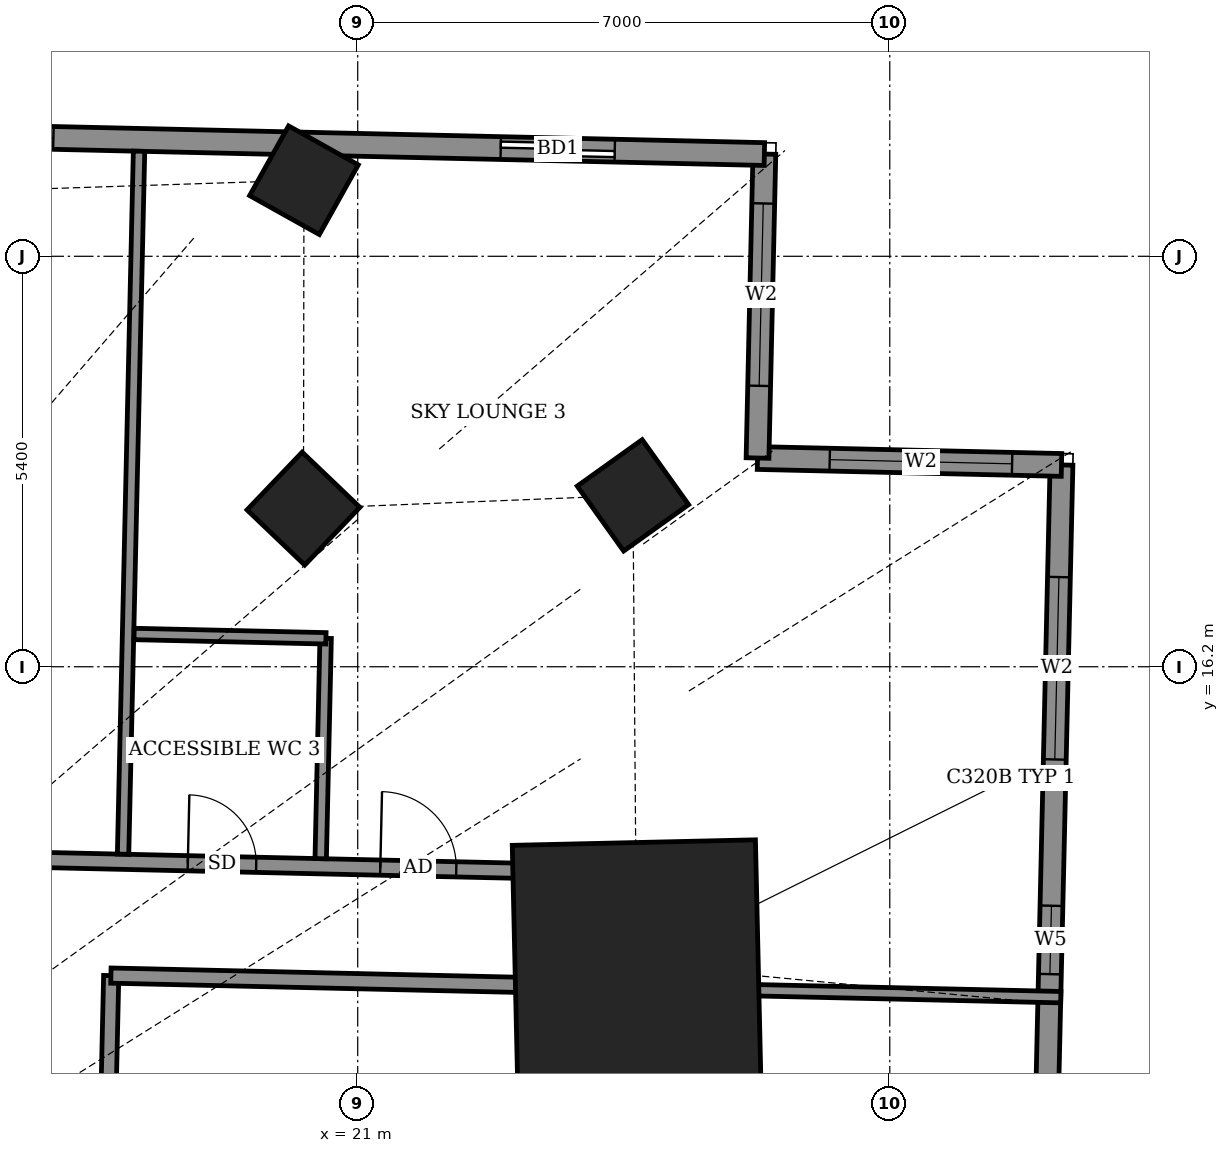
"""IFC4 building model, lengths in metres.
Left out: names, types, materials, properties, quantities, classifications, styles, units other than length and angle.
Written with IfcOpenShell. Run it as: python <this file> out.ifc"""

import sys

from ifc_helpers import new_model, si_unit, direction, frame, frame_2d, origin, origin_2d, place, context, subcontext, project, spatial, rectangle, extrude, element, fill, save


model = new_model("IFC4")
c1 = context("Model", 3, precision=1e-05, world=origin(), true_north=direction((0.0, 1.0)))
c2 = subcontext(c1, "Body", "Model", "MODEL_VIEW")
j1 = project(units=[si_unit("LENGTHUNIT", "METRE"), si_unit("PLANEANGLEUNIT", "RADIAN")], contexts=[c1])
p1 = place(None, origin())
s1 = spatial("IfcSite", under=j1, at=p1, CompositionType="ELEMENT")
p2 = place(p1, origin())
s2 = spatial("IfcBuilding", under=s1, at=p2, CompositionType="ELEMENT")
p3 = place(p2, frame((0.0, 0.0, 252.7)))
s3 = spatial("IfcBuildingStorey", under=s2, at=p3, CompositionType="ELEMENT", Elevation=252.7)
for number, where, z_axis, x_axis in (
    (1, (24.621, 18.455, -0.55), (0.0, 0.0, 1.0), (-0.581, 0.814, 0.0)),
    (2, (20.286, 18.281, -0.55), (0.0, 0.0, 1.0), (-0.723, 0.691, 0.0)),
    (3, (20.293, 22.601, -0.55), (0.0, 0.0, 1.0), (-0.873, 0.488, 0.0)),
):
    element("IfcColumn", number, at=place(p3, frame(where, z_axis=z_axis, x_axis=x_axis)), inside=s3, PredefinedType="COLUMN", context=c2, shape_type="SweptSolid", body=[
        extrude(rectangle(XDim=1.05, YDim=1.05, at=origin_2d()), origin(), (0.0, 0.0, 1.0), 4.6),
    ])
p4 = place(p3, frame((24.669, 12.287, -0.55), z_axis=(0.0, 0.0, 1.0), x_axis=(-0.022668680801, 0.999743032439, 0.0)))
e4 = element("IfcColumn", 4, at=p4, inside=s3, PredefinedType="COLUMN", context=c2, shape_type="SweptSolid", body=[
    extrude(rectangle(XDim=3.2, YDim=3.2, at=origin_2d()), origin(), (0.0, 0.0, 1.0), 4.6),
])
p5 = place(p3, frame((29.933, 4.529, 0.0), z_axis=(0.0, 0.0, 1.0), x_axis=(0.022745013272, 0.999741298722, 0.0)))
e5 = element("IfcWall", 5, at=p5, inside=s3, PredefinedType="SOLIDWALL", context=c2, shape_type="SweptSolid", body=[
    extrude(rectangle(XDim=14.33, YDim=0.3, at=frame_2d((7.165, 0.0))), origin(), (0.0, 0.0, 1.0), 2.85),
])
p6 = place(p5, frame((4.564, 0.0, 0.0)))
e6 = element("IfcOpeningElement", 6, at=p6, cuts=e5, PredefinedType="OPENING", context=c2, shape_type="SweptSolid", body=[
    extrude(rectangle(XDim=1.5, YDim=2.4, at=frame_2d((0.75, 1.2))), frame((0.0, 0.16, 0.0), z_axis=(0.0, -1.0, 0.0), x_axis=(1.0, 0.0, 0.0)), (0.0, 0.0, 1.0), 0.32),
])
p7 = place(p5, frame((7.629, 0.0, 0.9)))
e7 = element("IfcOpeningElement", 7, at=p7, cuts=e5, PredefinedType="OPENING", context=c2, shape_type="SweptSolid", body=[
    extrude(rectangle(XDim=0.9, YDim=1.5, at=frame_2d((0.45, 0.75))), frame((0.0, 0.16, 0.0), z_axis=(0.0, -1.0, 0.0), x_axis=(1.0, 0.0, 0.0)), (0.0, 0.0, 1.0), 0.32),
])
p8 = place(p5, frame((10.454, 0.0, 0.9)))
e8 = element("IfcOpeningElement", 8, at=p8, cuts=e5, PredefinedType="OPENING", context=c2, shape_type="SweptSolid", body=[
    extrude(rectangle(XDim=2.4, YDim=1.5, at=frame_2d((1.2, 0.75))), frame((0.0, 0.16, 0.0), z_axis=(0.0, -1.0, 0.0), x_axis=(1.0, 0.0, 0.0)), (0.0, 0.0, 1.0), 0.32),
])
p9 = place(p3, frame((30.259, 18.855, 0.0), z_axis=(0.0, 0.0, 1.0), x_axis=(-0.999740826251, 0.022765770952, 0.0)))
e9 = element("IfcWall", 9, at=p9, inside=s3, PredefinedType="SOLIDWALL", context=c2, shape_type="SweptSolid", body=[
    extrude(rectangle(XDim=4.0, YDim=0.3, at=frame_2d((2.0, 0.0))), origin(), (0.0, 0.0, 1.0), 2.85),
])
p10 = place(p9, frame((0.65, 0.0, 0.9)))
e10 = element("IfcOpeningElement", 10, at=p10, cuts=e9, PredefinedType="OPENING", context=c2, shape_type="SweptSolid", body=[
    extrude(rectangle(XDim=2.4, YDim=1.5, at=frame_2d((1.2, 0.75))), frame((0.0, 0.16, 0.0), z_axis=(0.0, -1.0, 0.0), x_axis=(1.0, 0.0, 0.0)), (0.0, 0.0, 1.0), 0.32),
])
p11 = place(p3, frame((26.26, 18.946, 0.0), z_axis=(0.0, 0.0, 1.0), x_axis=(0.022521758502, 0.999746353029, 0.0)))
e11 = element("IfcWall", 11, at=p11, inside=s3, PredefinedType="SOLIDWALL", context=c2, shape_type="SweptSolid", body=[
    extrude(rectangle(XDim=4.0, YDim=0.3, at=frame_2d((2.0, 0.0))), origin(), (0.0, 0.0, 1.0), 2.85),
])
p12 = place(p11, frame((0.95, 0.0, 0.9)))
e12 = element("IfcOpeningElement", 12, at=p12, cuts=e11, PredefinedType="OPENING", context=c2, shape_type="SweptSolid", body=[
    extrude(rectangle(XDim=2.4, YDim=1.5, at=frame_2d((1.2, 0.75))), frame((0.0, 0.16, 0.0), z_axis=(0.0, -1.0, 0.0), x_axis=(1.0, 0.0, 0.0)), (0.0, 0.0, 1.0), 0.32),
])
p13 = place(p3, frame((26.35, 22.945, 0.0), z_axis=(0.0, 0.0, 1.0), x_axis=(-0.999742523712, 0.022691105788, 0.0)))
e13 = element("IfcWall", 13, at=p13, inside=s3, PredefinedType="SOLIDWALL", context=c2, shape_type="SweptSolid", body=[
    extrude(rectangle(XDim=47.771, YDim=0.3, at=frame_2d((23.886, 0.0))), origin(), (0.0, 0.0, 1.0), 2.45),
])
p14 = place(p13, frame((1.969, 0.0, 0.0)))
e14 = element("IfcOpeningElement", 14, at=p14, cuts=e13, PredefinedType="OPENING", context=c2, shape_type="SweptSolid", body=[
    extrude(rectangle(XDim=1.5, YDim=2.4, at=frame_2d((0.75, 1.2))), frame((0.0, 0.16, 0.0), z_axis=(0.0, -1.0, 0.0), x_axis=(1.0, 0.0, 0.0)), (0.0, 0.0, 1.0), 0.32),
])
p15 = place(p13, frame((9.356, 0.0, 0.9)))
e15 = element("IfcOpeningElement", 15, at=p15, cuts=e13, PredefinedType="OPENING", context=c2, shape_type="SweptSolid", body=[
    extrude(rectangle(XDim=2.4, YDim=1.5, at=frame_2d((1.2, 0.75))), frame((0.0, 0.16, 0.0), z_axis=(0.0, -1.0, 0.0), x_axis=(1.0, 0.0, 0.0)), (0.0, 0.0, 1.0), 0.32),
])
p16 = place(p13, frame((21.81, 0.0, 0.9)))
e16 = element("IfcOpeningElement", 16, at=p16, cuts=e13, PredefinedType="OPENING", context=c2, shape_type="SweptSolid", body=[
    extrude(rectangle(XDim=2.4, YDim=1.5, at=frame_2d((1.2, 0.75))), frame((0.0, 0.16, 0.0), z_axis=(0.0, -1.0, 0.0), x_axis=(1.0, 0.0, 0.0)), (0.0, 0.0, 1.0), 0.32),
])
p17 = place(p13, frame((25.667, 0.0, 0.0)))
e17 = element("IfcOpeningElement", 17, at=p17, cuts=e13, PredefinedType="OPENING", context=c2, shape_type="SweptSolid", body=[
    extrude(rectangle(XDim=1.5, YDim=2.4, at=frame_2d((0.75, 1.2))), frame((0.0, 0.16, 0.0), z_axis=(0.0, -1.0, 0.0), x_axis=(1.0, 0.0, 0.0)), (0.0, 0.0, 1.0), 0.32),
])
p18 = place(p13, frame((30.997, 0.0, 0.9)))
e18 = element("IfcOpeningElement", 18, at=p18, cuts=e13, PredefinedType="OPENING", context=c2, shape_type="SweptSolid", body=[
    extrude(rectangle(XDim=2.4, YDim=1.5, at=frame_2d((1.2, 0.75))), frame((0.0, 0.16, 0.0), z_axis=(0.0, -1.0, 0.0), x_axis=(1.0, 0.0, 0.0)), (0.0, 0.0, 1.0), 0.32),
])
p19 = place(p13, frame((36.222, 0.0, 0.9)))
e19 = element("IfcOpeningElement", 19, at=p19, cuts=e13, PredefinedType="OPENING", context=c2, shape_type="SweptSolid", body=[
    extrude(rectangle(XDim=2.4, YDim=1.5, at=frame_2d((1.2, 0.75))), frame((0.0, 0.16, 0.0), z_axis=(0.0, -1.0, 0.0), x_axis=(1.0, 0.0, 0.0)), (0.0, 0.0, 1.0), 0.32),
])
p20 = place(p13, frame((42.972, 0.0, 0.9)))
e20 = element("IfcOpeningElement", 20, at=p20, cuts=e13, PredefinedType="OPENING", context=c2, shape_type="SweptSolid", body=[
    extrude(rectangle(XDim=2.4, YDim=1.5, at=frame_2d((1.2, 0.75))), frame((0.0, 0.16, 0.0), z_axis=(0.0, -1.0, 0.0), x_axis=(1.0, 0.0, 0.0)), (0.0, 0.0, 1.0), 0.32),
])
p21 = place(p3, frame((17.661, 7.904, 0.0), z_axis=(0.0, 0.0, 1.0), x_axis=(0.022718785711, 0.999741895079, 0.0)))
e21 = element("IfcWall", 21, at=p21, inside=s3, PredefinedType="PARTITIONING", context=c2, shape_type="SweptSolid", body=[
    extrude(rectangle(XDim=4.234, YDim=0.2, at=frame_2d((2.117, 0.0))), origin(), (0.0, 0.0, 1.0), 2.85),
])
p22 = place(p21, frame((1.719, 0.0, 0.0)))
e22 = element("IfcOpeningElement", 22, at=p22, cuts=e21, PredefinedType="OPENING", context=c2, shape_type="SweptSolid", body=[
    extrude(rectangle(XDim=1.0, YDim=2.1, at=frame_2d((0.5, 1.05))), frame((0.0, 0.11, 0.0), z_axis=(0.0, -1.0, 0.0), x_axis=(1.0, 0.0, 0.0)), (0.0, 0.0, 1.0), 0.22),
])
p23 = place(p3, frame((17.753, 12.137, 0.0), z_axis=(0.0, 0.0, 1.0), x_axis=(0.999742772321, -0.022680149738, 0.0)))
e23 = element("IfcWall", 23, at=p23, inside=s3, PredefinedType="PARTITIONING", context=c2, shape_type="SweptSolid", body=[
    extrude(rectangle(XDim=5.511, YDim=0.2, at=frame_2d((2.756, 0.0))), origin(), (0.0, 0.0, 1.0), 2.85),
])
p24 = place(p3, frame((23.263, 12.012, 0.0), z_axis=(0.0, 0.0, 1.0), x_axis=(0.999741384486, -0.022741243275, 0.0)))
e24 = element("IfcWall", 24, at=p24, inside=s3, PredefinedType="PARTITIONING", context=c2, shape_type="SweptSolid", body=[
    extrude(rectangle(XDim=6.989, YDim=0.15, at=frame_2d((3.494, 0.0))), origin(), (0.0, 0.0, 1.0), 2.85),
])
p25 = place(p3, frame((23.266, 12.012, 0.0), z_axis=(0.0, 0.0, 1.0), x_axis=(0.022617910375, 0.999744182344, 0.0)))
e25 = element("IfcWall", 25, at=p25, inside=s3, PredefinedType="PARTITIONING", context=c2, shape_type="SweptSolid", body=[
    extrude(rectangle(XDim=1.5, YDim=0.2, at=frame_2d((0.75, 0.0))), origin(), (0.0, 0.0, 1.0), 4.05),
])
p26 = place(p3, frame((-24.974, 14.607, 0.0), z_axis=(0.0, 0.0, 1.0), x_axis=(0.999742823946, -0.02267787398, 0.0)))
e26 = element("IfcWall", 26, at=p26, inside=s3, PredefinedType="PARTITIONING", context=c2, shape_type="SweptSolid", body=[
    extrude(rectangle(XDim=48.284, YDim=0.2, at=frame_2d((24.142, 0.0))), origin(), (0.0, 0.0, 1.0), 2.45),
])
p27 = place(p26, frame((46.283, 0.0, 0.0)))
e27 = element("IfcOpeningElement", 27, at=p27, cuts=e26, PredefinedType="OPENING", context=c2, shape_type="SweptSolid", body=[
    extrude(rectangle(XDim=1.0, YDim=2.1, at=frame_2d((0.5, 1.05))), frame((0.0, 0.11, 0.0), z_axis=(0.0, -1.0, 0.0), x_axis=(1.0, 0.0, 0.0)), (0.0, 0.0, 1.0), 0.22),
])
p28 = place(p26, frame((43.75, 0.0, 0.0)))
e28 = element("IfcOpeningElement", 28, at=p28, cuts=e26, PredefinedType="OPENING", context=c2, shape_type="SweptSolid", body=[
    extrude(rectangle(XDim=0.9, YDim=2.1, at=frame_2d((0.45, 1.05))), frame((0.0, 0.11, 0.0), z_axis=(0.0, -1.0, 0.0), x_axis=(1.0, 0.0, 0.0)), (0.0, 0.0, 1.0), 0.22),
])
p29 = place(p26, frame((39.4, 0.0, 0.0)))
e29 = element("IfcOpeningElement", 29, at=p29, cuts=e26, PredefinedType="OPENING", context=c2, shape_type="SweptSolid", body=[
    extrude(rectangle(XDim=1.0, YDim=2.1, at=frame_2d((0.5, 1.05))), frame((0.0, 0.11, 0.0), z_axis=(0.0, -1.0, 0.0), x_axis=(1.0, 0.0, 0.0)), (0.0, 0.0, 1.0), 0.22),
])
p30 = place(p26, frame((35.25, 0.0, 0.0)))
e30 = element("IfcOpeningElement", 30, at=p30, cuts=e26, PredefinedType="OPENING", context=c2, shape_type="SweptSolid", body=[
    extrude(rectangle(XDim=0.9, YDim=2.1, at=frame_2d((0.45, 1.05))), frame((0.0, 0.11, 0.0), z_axis=(0.0, -1.0, 0.0), x_axis=(1.0, 0.0, 0.0)), (0.0, 0.0, 1.0), 0.22),
])
p31 = place(p26, frame((28.625, 0.0, 0.0)))
e31 = element("IfcOpeningElement", 31, at=p31, cuts=e26, PredefinedType="OPENING", context=c2, shape_type="SweptSolid", body=[
    extrude(rectangle(XDim=1.0, YDim=2.1, at=frame_2d((0.5, 1.05))), frame((0.0, 0.11, 0.0), z_axis=(0.0, -1.0, 0.0), x_axis=(1.0, 0.0, 0.0)), (0.0, 0.0, 1.0), 0.22),
])
p32 = place(p26, frame((32.85, 0.0, 0.0)))
e32 = element("IfcOpeningElement", 32, at=p32, cuts=e26, PredefinedType="OPENING", context=c2, shape_type="SweptSolid", body=[
    extrude(rectangle(XDim=0.9, YDim=2.1, at=frame_2d((0.45, 1.05))), frame((0.0, 0.11, 0.0), z_axis=(0.0, -1.0, 0.0), x_axis=(1.0, 0.0, 0.0)), (0.0, 0.0, 1.0), 0.22),
])
p33 = place(p26, frame((24.4, 0.0, 0.0)))
e33 = element("IfcOpeningElement", 33, at=p33, cuts=e26, PredefinedType="OPENING", context=c2, shape_type="SweptSolid", body=[
    extrude(rectangle(XDim=0.9, YDim=2.1, at=frame_2d((0.45, 1.05))), frame((0.0, 0.11, 0.0), z_axis=(0.0, -1.0, 0.0), x_axis=(1.0, 0.0, 0.0)), (0.0, 0.0, 1.0), 0.22),
])
p34 = place(p26, frame((17.225, 0.0, 0.0)))
e34 = element("IfcOpeningElement", 34, at=p34, cuts=e26, PredefinedType="OPENING", context=c2, shape_type="SweptSolid", body=[
    extrude(rectangle(XDim=1.0, YDim=2.1, at=frame_2d((0.5, 1.05))), frame((0.0, 0.11, 0.0), z_axis=(0.0, -1.0, 0.0), x_axis=(1.0, 0.0, 0.0)), (0.0, 0.0, 1.0), 0.22),
])
p35 = place(p26, frame((19.5, 0.0, 0.0)))
e35 = element("IfcOpeningElement", 35, at=p35, cuts=e26, PredefinedType="OPENING", context=c2, shape_type="SweptSolid", body=[
    extrude(rectangle(XDim=0.9, YDim=2.1, at=frame_2d((0.45, 1.05))), frame((0.0, 0.11, 0.0), z_axis=(0.0, -1.0, 0.0), x_axis=(1.0, 0.0, 0.0)), (0.0, 0.0, 1.0), 0.22),
])
p36 = place(p26, frame((14.4, 0.0, 0.0)))
e36 = element("IfcOpeningElement", 36, at=p36, cuts=e26, PredefinedType="OPENING", context=c2, shape_type="SweptSolid", body=[
    extrude(rectangle(XDim=1.0, YDim=2.1, at=frame_2d((0.5, 1.05))), frame((0.0, 0.11, 0.0), z_axis=(0.0, -1.0, 0.0), x_axis=(1.0, 0.0, 0.0)), (0.0, 0.0, 1.0), 0.22),
])
p37 = place(p26, frame((11.45, 0.0, 0.0)))
e37 = element("IfcOpeningElement", 37, at=p37, cuts=e26, PredefinedType="OPENING", context=c2, shape_type="SweptSolid", body=[
    extrude(rectangle(XDim=0.9, YDim=2.1, at=frame_2d((0.45, 1.05))), frame((0.0, 0.11, 0.0), z_axis=(0.0, -1.0, 0.0), x_axis=(1.0, 0.0, 0.0)), (0.0, 0.0, 1.0), 0.22),
])
p38 = place(p26, frame((2.95, 0.0, 0.0)))
e38 = element("IfcOpeningElement", 38, at=p38, cuts=e26, PredefinedType="OPENING", context=c2, shape_type="SweptSolid", body=[
    extrude(rectangle(XDim=1.0, YDim=2.1, at=frame_2d((0.5, 1.05))), frame((0.0, 0.11, 0.0), z_axis=(0.0, -1.0, 0.0), x_axis=(1.0, 0.0, 0.0)), (0.0, 0.0, 1.0), 0.22),
])
p39 = place(p26, frame((9.05, 0.0, 0.0)))
e39 = element("IfcOpeningElement", 39, at=p39, cuts=e26, PredefinedType="OPENING", context=c2, shape_type="SweptSolid", body=[
    extrude(rectangle(XDim=0.9, YDim=2.1, at=frame_2d((0.45, 1.05))), frame((0.0, 0.11, 0.0), z_axis=(0.0, -1.0, 0.0), x_axis=(1.0, 0.0, 0.0)), (0.0, 0.0, 1.0), 0.22),
])
p40 = place(p3, frame((17.913, 13.734, 0.0), z_axis=(0.0, 0.0, 1.0), x_axis=(0.022697424684, 0.999742380272, 0.0)))
e40 = element("IfcWall", 40, at=p40, inside=s3, PredefinedType="PARTITIONING", context=c2, shape_type="SweptSolid", body=[
    extrude(rectangle(XDim=9.25, YDim=0.15, at=frame_2d((4.625, 0.0))), origin(), (0.0, 0.0, 1.0), 2.45),
])
p41 = place(p3, frame((20.513, 13.675, 0.0), z_axis=(0.0, 0.0, 1.0), x_axis=(0.022396267458, 0.999749172145, 0.0)))
e41 = element("IfcWall", 41, at=p41, inside=s3, PredefinedType="PARTITIONING", context=c2, shape_type="SweptSolid", body=[
    extrude(rectangle(XDim=2.9, YDim=0.15, at=frame_2d((1.45, 0.0))), origin(), (0.0, 0.0, 1.0), 2.85),
])
p42 = place(p3, frame((18.058, 16.631, 0.0), z_axis=(0.0, 0.0, 1.0), x_axis=(0.99974392816, -0.022629142889, 0.0)))
e42 = element("IfcWall", 42, at=p42, inside=s3, PredefinedType="PARTITIONING", context=c2, shape_type="SweptSolid", body=[
    extrude(rectangle(XDim=2.525, YDim=0.15, at=frame_2d((1.262, 0.0))), origin(), (0.0, 0.0, 1.0), 2.85),
])
p43 = place(p7, origin())
e43 = element("IfcWindow", 43, at=p43, inside=s3, PartitioningType="SINGLE_PANEL", PredefinedType="WINDOW", context=c2, shape_type="SweptSolid", body=[
    extrude(rectangle(XDim=0.9, YDim=1.5, at=frame_2d((0.45, 0.75))), frame((0.0, 0.03, 0.0), z_axis=(0.0, -1.0, 0.0), x_axis=(1.0, 0.0, 0.0)), (0.0, 0.0, 1.0), 0.06),
])
fill(e7, e43)
p44 = place(p8, origin())
e44 = element("IfcWindow", 44, at=p44, inside=s3, PartitioningType="DOUBLE_PANEL_VERTICAL", PredefinedType="WINDOW", context=c2, shape_type="SweptSolid", body=[
    extrude(rectangle(XDim=2.4, YDim=1.5, at=frame_2d((1.2, 0.75))), frame((0.0, 0.03, 0.0), z_axis=(0.0, -1.0, 0.0), x_axis=(1.0, 0.0, 0.0)), (0.0, 0.0, 1.0), 0.06),
])
fill(e8, e44)
p45 = place(p10, origin())
e45 = element("IfcWindow", 45, at=p45, inside=s3, PartitioningType="DOUBLE_PANEL_VERTICAL", PredefinedType="WINDOW", context=c2, shape_type="SweptSolid", body=[
    extrude(rectangle(XDim=2.4, YDim=1.5, at=frame_2d((1.2, 0.75))), frame((0.0, 0.03, 0.0), z_axis=(0.0, -1.0, 0.0), x_axis=(1.0, 0.0, 0.0)), (0.0, 0.0, 1.0), 0.06),
])
fill(e10, e45)
p46 = place(p12, origin())
e46 = element("IfcWindow", 46, at=p46, inside=s3, PartitioningType="DOUBLE_PANEL_VERTICAL", PredefinedType="WINDOW", context=c2, shape_type="SweptSolid", body=[
    extrude(rectangle(XDim=2.4, YDim=1.5, at=frame_2d((1.2, 0.75))), frame((0.0, 0.03, 0.0), z_axis=(0.0, -1.0, 0.0), x_axis=(1.0, 0.0, 0.0)), (0.0, 0.0, 1.0), 0.06),
])
fill(e12, e46)
p47 = place(p14, origin())
e47 = element("IfcDoor", 47, at=p47, inside=s3, OperationType="SLIDING_TO_LEFT", PredefinedType="DOOR", context=c2, shape_type="SweptSolid", body=[
    extrude(rectangle(XDim=1.5, YDim=2.4, at=frame_2d((0.75, 1.2))), frame((0.0, 0.025, 0.0), z_axis=(0.0, -1.0, 0.0), x_axis=(1.0, 0.0, 0.0)), (0.0, 0.0, 1.0), 0.05),
])
fill(e14, e47)
p48 = place(p15, origin())
e48 = element("IfcWindow", 48, at=p48, inside=s3, PartitioningType="DOUBLE_PANEL_VERTICAL", PredefinedType="WINDOW", context=c2, shape_type="SweptSolid", body=[
    extrude(rectangle(XDim=2.4, YDim=1.5, at=frame_2d((1.2, 0.75))), frame((0.0, 0.03, 0.0), z_axis=(0.0, -1.0, 0.0), x_axis=(1.0, 0.0, 0.0)), (0.0, 0.0, 1.0), 0.06),
])
fill(e15, e48)
p49 = place(p27, origin())
e49 = element("IfcDoor", 49, at=p49, inside=s3, OperationType="SINGLE_SWING_LEFT", PredefinedType="DOOR", context=c2, shape_type="SweptSolid", body=[
    extrude(rectangle(XDim=1.0, YDim=2.1, at=frame_2d((0.5, 1.05))), frame((0.0, 0.025, 0.0), z_axis=(0.0, -1.0, 0.0), x_axis=(1.0, 0.0, 0.0)), (0.0, 0.0, 1.0), 0.05),
])
fill(e27, e49)
p50 = place(p28, origin())
e50 = element("IfcDoor", 50, at=p50, inside=s3, OperationType="SINGLE_SWING_LEFT", PredefinedType="DOOR", context=c2, shape_type="SweptSolid", body=[
    extrude(rectangle(XDim=0.9, YDim=2.1, at=frame_2d((0.45, 1.05))), frame((0.0, 0.025, 0.0), z_axis=(0.0, -1.0, 0.0), x_axis=(1.0, 0.0, 0.0)), (0.0, 0.0, 1.0), 0.05),
])
fill(e28, e50)
save(model, sys.argv[1])
